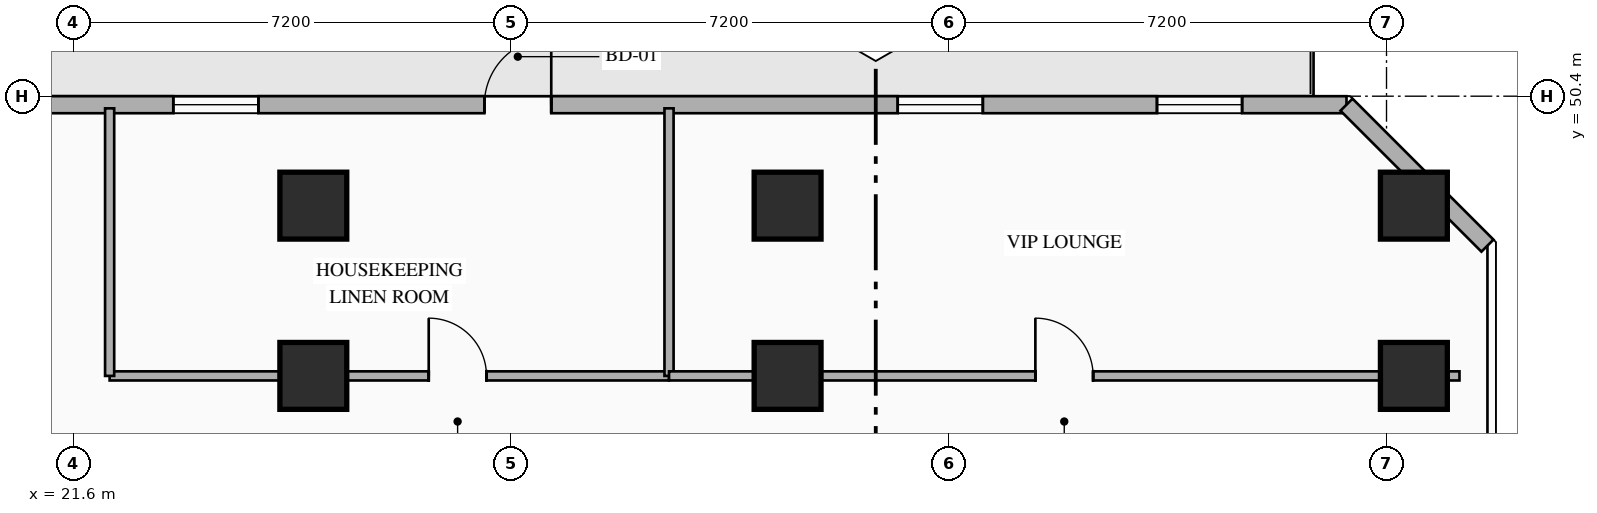
"""IFC4 building model, lengths in metres.
Left out: names, types, materials, properties, quantities, classifications, styles, units other than length and angle.
Written with IfcOpenShell. Run it as: python <this file> out.ifc"""

import sys

from ifc_helpers import new_model, si_unit, direction, frame, frame_2d, origin, origin_2d, place, context, subcontext, project, spatial, rectangle, hollow_rectangle, extrude, element, fill, save


model = new_model("IFC4")
c1 = context("Model", 3, precision=1e-05, world=origin(), true_north=direction((0.0, 1.0)))
c2 = subcontext(c1, "Body", "Model", "MODEL_VIEW")
j1 = project(units=[si_unit("LENGTHUNIT", "METRE"), si_unit("PLANEANGLEUNIT", "RADIAN")], contexts=[c1])
p1 = place(None, origin())
s1 = spatial("IfcSite", under=j1, at=p1, CompositionType="ELEMENT")
p2 = place(p1, origin())
s2 = spatial("IfcBuilding", under=s1, at=p2, CompositionType="ELEMENT")
p3 = place(p2, frame((0.0, 0.0, 50.0)))
s3 = spatial("IfcBuildingStorey", under=s2, at=p3, CompositionType="ELEMENT", Elevation=50.0)
for number, where, z_axis, x_axis in (
    (1, (25.55, 45.8, 0.0), (0.0, 0.0, 1.0), (1.0, 0.0, 0.0)),
    (2, (33.35, 45.8, 0.0), (0.0, 0.0, 1.0), (1.0, 0.0, 0.0)),
    (3, (43.65, 45.8, 0.0), (0.0, 0.0, 1.0), (1.0, 0.0, 0.0)),
    (4, (25.55, 48.6, 0.0), (0.0, 0.0, 1.0), (1.0, 0.0, 0.0)),
    (5, (33.35, 48.6, 0.0), (0.0, 0.0, 1.0), (1.0, 0.0, 0.0)),
    (6, (43.65, 48.6, 0.0), (0.0, 0.0, 1.0), (1.0, 0.0, 0.0)),
):
    element("IfcColumn", number, at=place(p3, frame(where, z_axis=z_axis, x_axis=x_axis)), inside=s3, PredefinedType="COLUMN", context=c2, shape_type="SweptSolid", body=[
        extrude(hollow_rectangle(XDim=1.1, YDim=1.1, WallThickness=0.04, at=origin_2d()), origin(), (0.0, 0.0, 1.0), 3.35),
    ])
p4 = place(p3, frame((2.458, 50.26, 0.0), z_axis=(0.0, 0.0, 1.0), x_axis=(1.0, 0.0, 0.0)))
e7 = element("IfcWall", 7, at=p4, inside=s3, PredefinedType="STANDARD", context=c2, shape_type="SweptSolid", body=[
    extrude(rectangle(XDim=40.084, YDim=0.28, at=frame_2d((20.042, 0.0))), origin(), (0.0, 0.0, 1.0), 3.13),
])
p5 = place(p4, frame((25.905, 0.0, 0.0)))
e8 = element("IfcOpeningElement", 8, at=p5, cuts=e7, PredefinedType="OPENING", context=c2, shape_type="SweptSolid", body=[
    extrude(rectangle(XDim=1.1, YDim=2.2, at=frame_2d((0.55, 1.1))), frame((0.0, 0.15, 0.0), z_axis=(0.0, -1.0, 0.0), x_axis=(1.0, 0.0, 0.0)), (0.0, 0.0, 1.0), 0.3),
])
p6 = place(p4, frame((1.717, 0.0, 0.85)))
e9 = element("IfcOpeningElement", 9, at=p6, cuts=e7, PredefinedType="OPENING", context=c2, shape_type="SweptSolid", body=[
    extrude(rectangle(XDim=1.4, YDim=1.8, at=frame_2d((0.7, 0.9))), frame((0.0, 0.15, 0.0), z_axis=(0.0, -1.0, 0.0), x_axis=(1.0, 0.0, 0.0)), (0.0, 0.0, 1.0), 0.3),
])
p7 = place(p4, frame((5.981, 0.0, 0.85)))
e10 = element("IfcOpeningElement", 10, at=p7, cuts=e7, PredefinedType="OPENING", context=c2, shape_type="SweptSolid", body=[
    extrude(rectangle(XDim=1.4, YDim=1.8, at=frame_2d((0.7, 0.9))), frame((0.0, 0.15, 0.0), z_axis=(0.0, -1.0, 0.0), x_axis=(1.0, 0.0, 0.0)), (0.0, 0.0, 1.0), 0.3),
])
p8 = place(p4, frame((11.261, 0.0, 0.85)))
e11 = element("IfcOpeningElement", 11, at=p8, cuts=e7, PredefinedType="OPENING", context=c2, shape_type="SweptSolid", body=[
    extrude(rectangle(XDim=1.4, YDim=1.8, at=frame_2d((0.7, 0.9))), frame((0.0, 0.15, 0.0), z_axis=(0.0, -1.0, 0.0), x_axis=(1.0, 0.0, 0.0)), (0.0, 0.0, 1.0), 0.3),
])
p9 = place(p4, frame((14.02, 0.0, 0.85)))
e12 = element("IfcOpeningElement", 12, at=p9, cuts=e7, PredefinedType="OPENING", context=c2, shape_type="SweptSolid", body=[
    extrude(rectangle(XDim=1.4, YDim=1.8, at=frame_2d((0.7, 0.9))), frame((0.0, 0.15, 0.0), z_axis=(0.0, -1.0, 0.0), x_axis=(1.0, 0.0, 0.0)), (0.0, 0.0, 1.0), 0.3),
])
p10 = place(p4, frame((20.789, 0.0, 0.85)))
e13 = element("IfcOpeningElement", 13, at=p10, cuts=e7, PredefinedType="OPENING", context=c2, shape_type="SweptSolid", body=[
    extrude(rectangle(XDim=1.4, YDim=1.8, at=frame_2d((0.7, 0.9))), frame((0.0, 0.15, 0.0), z_axis=(0.0, -1.0, 0.0), x_axis=(1.0, 0.0, 0.0)), (0.0, 0.0, 1.0), 0.3),
])
p11 = place(p4, frame((32.703, 0.0, 0.85)))
e14 = element("IfcOpeningElement", 14, at=p11, cuts=e7, PredefinedType="OPENING", context=c2, shape_type="SweptSolid", body=[
    extrude(rectangle(XDim=1.4, YDim=1.8, at=frame_2d((0.7, 0.9))), frame((0.0, 0.15, 0.0), z_axis=(0.0, -1.0, 0.0), x_axis=(1.0, 0.0, 0.0)), (0.0, 0.0, 1.0), 0.3),
])
p12 = place(p4, frame((36.967, 0.0, 0.85)))
e15 = element("IfcOpeningElement", 15, at=p12, cuts=e7, PredefinedType="OPENING", context=c2, shape_type="SweptSolid", body=[
    extrude(rectangle(XDim=1.4, YDim=1.8, at=frame_2d((0.7, 0.9))), frame((0.0, 0.15, 0.0), z_axis=(0.0, -1.0, 0.0), x_axis=(1.0, 0.0, 0.0)), (0.0, 0.0, 1.0), 0.3),
])
p13 = place(p3, frame((42.542, 50.26, 0.0), z_axis=(0.0, 0.0, 1.0), x_axis=(0.707106781187, -0.707106781187, 0.0)))
e16 = element("IfcWall", 16, at=p13, inside=s3, PredefinedType="STANDARD", context=c2, shape_type="SweptSolid", body=[
    extrude(rectangle(XDim=3.278, YDim=0.28, at=frame_2d((1.639, 0.0))), origin(), (0.0, 0.0, 1.0), 3.13),
])
p14 = place(p3, frame((22.2, 45.8, 0.0), z_axis=(0.0, 0.0, 1.0), x_axis=(1.0, 0.0, 0.0)))
e17 = element("IfcWall", 17, at=p14, inside=s3, PredefinedType="PARTITIONING", context=c2, shape_type="SweptSolid", body=[
    extrude(rectangle(XDim=9.2, YDim=0.15, at=frame_2d((4.6, 0.0))), origin(), (0.0, 0.0, 1.0), 2.425),
])
p15 = place(p14, frame((5.248, 0.0, 0.0)))
e18 = element("IfcOpeningElement", 18, at=p15, cuts=e17, PredefinedType="OPENING", context=c2, shape_type="SweptSolid", body=[
    extrude(rectangle(XDim=0.95, YDim=2.15, at=frame_2d((0.475, 1.075))), frame((0.0, 0.085, 0.0), z_axis=(0.0, -1.0, 0.0), x_axis=(1.0, 0.0, 0.0)), (0.0, 0.0, 1.0), 0.17),
])
for number, where, z_axis, x_axis in (
    (19, (22.2, 45.8, 0.0), (0.0, 0.0, 1.0), (0.0, 1.0, 0.0)),
    (20, (31.4, 45.8, 0.0), (0.0, 0.0, 1.0), (0.0, 1.0, 0.0)),
):
    element("IfcWall", number, at=place(p3, frame(where, z_axis=z_axis, x_axis=x_axis)), inside=s3, PredefinedType="PARTITIONING", context=c2, shape_type="SweptSolid", body=[
        extrude(rectangle(XDim=4.4, YDim=0.15, at=frame_2d((2.2, 0.0))), origin(), (0.0, 0.0, 1.0), 3.13),
    ])
p16 = place(p3, frame((31.4, 45.8, 0.0), z_axis=(0.0, 0.0, 1.0), x_axis=(1.0, 0.0, 0.0)))
e21 = element("IfcWall", 21, at=p16, inside=s3, PredefinedType="PARTITIONING", context=c2, shape_type="SweptSolid", body=[
    extrude(rectangle(XDim=13.0, YDim=0.15, at=frame_2d((6.5, 0.0))), origin(), (0.0, 0.0, 1.0), 2.425),
])
p17 = place(p16, frame((6.025, 0.0, 0.0)))
e22 = element("IfcOpeningElement", 22, at=p17, cuts=e21, PredefinedType="OPENING", context=c2, shape_type="SweptSolid", body=[
    extrude(rectangle(XDim=0.95, YDim=2.15, at=frame_2d((0.475, 1.075))), frame((0.0, 0.085, 0.0), z_axis=(0.0, -1.0, 0.0), x_axis=(1.0, 0.0, 0.0)), (0.0, 0.0, 1.0), 0.17),
])
p18 = place(p5, origin())
e23 = element("IfcDoor", 23, at=p18, inside=s3, OperationType="SINGLE_SWING_RIGHT", PredefinedType="DOOR", context=c2, shape_type="SweptSolid", body=[
    extrude(rectangle(XDim=1.1, YDim=2.2, at=frame_2d((0.55, 1.1))), frame((0.0, 0.025, 0.0), z_axis=(0.0, -1.0, 0.0), x_axis=(1.0, 0.0, 0.0)), (0.0, 0.0, 1.0), 0.05),
])
fill(e8, e23)
p19 = place(p10, origin())
e24 = element("IfcWindow", 24, at=p19, inside=s3, PartitioningType="SINGLE_PANEL", PredefinedType="WINDOW", context=c2, shape_type="SweptSolid", body=[
    extrude(rectangle(XDim=1.4, YDim=1.8, at=frame_2d((0.7, 0.9))), frame((0.0, 0.03, 0.0), z_axis=(0.0, -1.0, 0.0), x_axis=(1.0, 0.0, 0.0)), (0.0, 0.0, 1.0), 0.06),
])
fill(e13, e24)
p20 = place(p11, origin())
e25 = element("IfcWindow", 25, at=p20, inside=s3, PartitioningType="SINGLE_PANEL", PredefinedType="WINDOW", context=c2, shape_type="SweptSolid", body=[
    extrude(rectangle(XDim=1.4, YDim=1.8, at=frame_2d((0.7, 0.9))), frame((0.0, 0.03, 0.0), z_axis=(0.0, -1.0, 0.0), x_axis=(1.0, 0.0, 0.0)), (0.0, 0.0, 1.0), 0.06),
])
fill(e14, e25)
p21 = place(p12, origin())
e26 = element("IfcWindow", 26, at=p21, inside=s3, PartitioningType="SINGLE_PANEL", PredefinedType="WINDOW", context=c2, shape_type="SweptSolid", body=[
    extrude(rectangle(XDim=1.4, YDim=1.8, at=frame_2d((0.7, 0.9))), frame((0.0, 0.03, 0.0), z_axis=(0.0, -1.0, 0.0), x_axis=(1.0, 0.0, 0.0)), (0.0, 0.0, 1.0), 0.06),
])
fill(e15, e26)
p22 = place(p15, origin())
e27 = element("IfcDoor", 27, at=p22, inside=s3, OperationType="SINGLE_SWING_LEFT", PredefinedType="DOOR", context=c2, shape_type="SweptSolid", body=[
    extrude(rectangle(XDim=0.95, YDim=2.15, at=frame_2d((0.475, 1.075))), frame((0.0, 0.025, 0.0), z_axis=(0.0, -1.0, 0.0), x_axis=(1.0, 0.0, 0.0)), (0.0, 0.0, 1.0), 0.05),
])
fill(e18, e27)
p23 = place(p17, origin())
e28 = element("IfcDoor", 28, at=p23, inside=s3, OperationType="SINGLE_SWING_LEFT", PredefinedType="DOOR", context=c2, shape_type="SweptSolid", body=[
    extrude(rectangle(XDim=0.95, YDim=2.15, at=frame_2d((0.475, 1.075))), frame((0.0, 0.025, 0.0), z_axis=(0.0, -1.0, 0.0), x_axis=(1.0, 0.0, 0.0)), (0.0, 0.0, 1.0), 0.05),
])
fill(e22, e28)
save(model, sys.argv[1])
